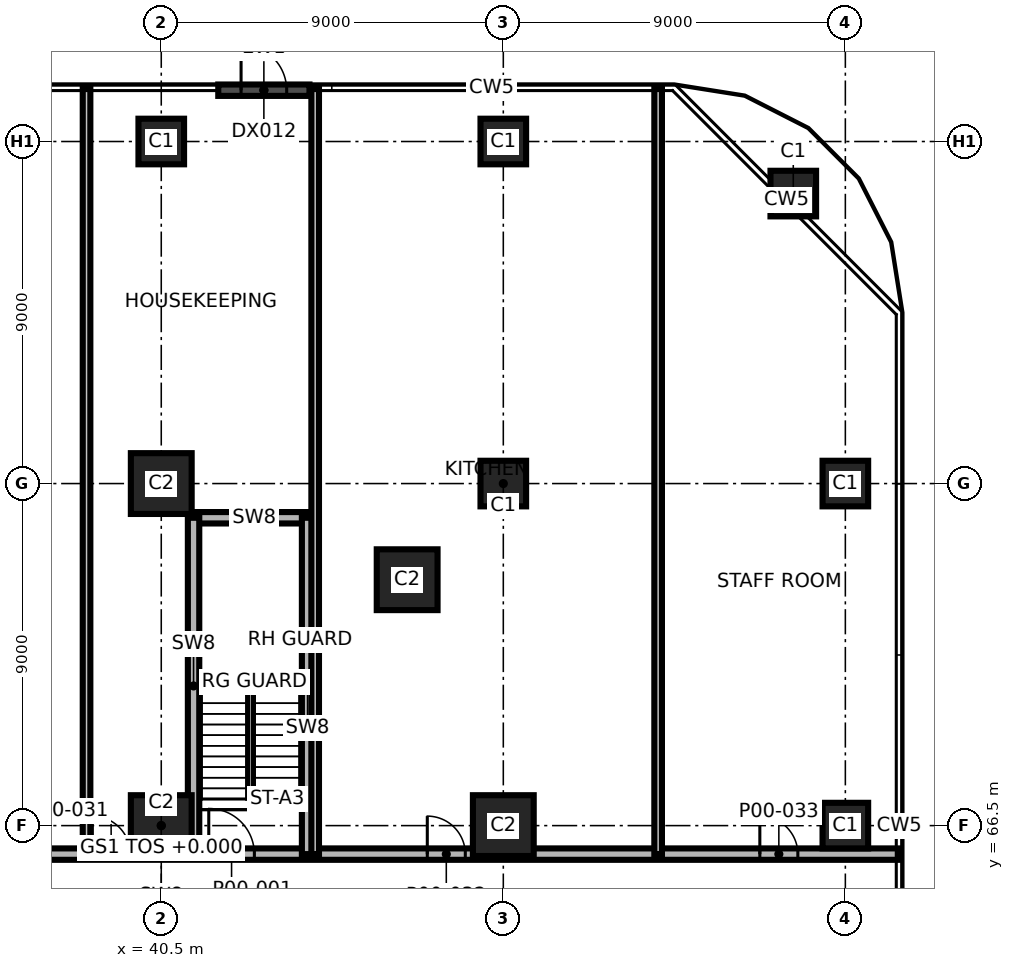
"""IFC4 building model, lengths in metres.
Left out: names, types, materials, properties, quantities, classifications, styles, units other than length and angle.
Written with IfcOpenShell. Run it as: python <this file> out.ifc"""

import sys

from ifc_helpers import new_model, si_unit, direction, frame, frame_2d, origin, origin_2d, place, context, subcontext, project, spatial, rectangle, extrude, element, fill, save


model = new_model("IFC4")
c1 = context("Model", 3, precision=1e-05, world=origin(), true_north=direction((0.0, 1.0)))
c2 = subcontext(c1, "Body", "Model", "MODEL_VIEW")
j1 = project(units=[si_unit("LENGTHUNIT", "METRE"), si_unit("PLANEANGLEUNIT", "RADIAN")], contexts=[c1])
p1 = place(None, origin())
s1 = spatial("IfcSite", under=j1, at=p1, CompositionType="ELEMENT")
p2 = place(p1, origin())
s2 = spatial("IfcBuilding", under=s1, at=p2, CompositionType="ELEMENT")
p3 = place(p2, origin())
s3 = spatial("IfcBuildingStorey", under=s2, at=p3, CompositionType="ELEMENT", Elevation=0.0)
for number, where, z_axis, x_axis in (
    (1, (40.5, 66.5, 0.0), (0.0, 0.0, 1.0), (1.0, 0.0, 0.0)),
    (2, (49.5, 66.5, 0.0), (0.0, 0.0, 1.0), (1.0, 0.0, 0.0)),
):
    element("IfcColumn", number, at=place(p3, frame(where, z_axis=z_axis, x_axis=x_axis)), inside=s3, PredefinedType="COLUMN", context=c2, shape_type="SweptSolid", body=[
        extrude(rectangle(XDim=1.6, YDim=1.6, at=origin_2d()), origin(), (0.0, 0.0, 1.0), 8.0),
    ])
p4 = place(p3, frame((58.5, 66.5, 0.0), z_axis=(0.0, 0.0, 1.0), x_axis=(1.0, 0.0, 0.0)))
e3 = element("IfcColumn", 3, at=p4, inside=s3, PredefinedType="COLUMN", context=c2, shape_type="SweptSolid", body=[
    extrude(rectangle(XDim=1.2, YDim=1.2, at=origin_2d()), origin(), (0.0, 0.0, 1.0), 8.0),
])
p5 = place(p3, frame((40.5, 75.5, 0.0), z_axis=(0.0, 0.0, 1.0), x_axis=(1.0, 0.0, 0.0)))
e4 = element("IfcColumn", 4, at=p5, inside=s3, PredefinedType="COLUMN", context=c2, shape_type="SweptSolid", body=[
    extrude(rectangle(XDim=1.6, YDim=1.6, at=origin_2d()), origin(), (0.0, 0.0, 1.0), 8.0),
])
for number, where, z_axis, x_axis in (
    (5, (49.5, 75.5, 0.0), (0.0, 0.0, 1.0), (1.0, 0.0, 0.0)),
    (6, (58.5, 75.5, 0.0), (0.0, 0.0, 1.0), (1.0, 0.0, 0.0)),
    (7, (57.13, 83.13, 0.0), (0.0, 0.0, 1.0), (1.0, 0.0, 0.0)),
    (8, (40.5, 84.5, 0.0), (0.0, 0.0, 1.0), (1.0, 0.0, 0.0)),
    (9, (49.5, 84.5, 0.0), (0.0, 0.0, 1.0), (1.0, 0.0, 0.0)),
):
    element("IfcColumn", number, at=place(p3, frame(where, z_axis=z_axis, x_axis=x_axis)), inside=s3, PredefinedType="COLUMN", context=c2, shape_type="SweptSolid", body=[
        extrude(rectangle(XDim=1.2, YDim=1.2, at=origin_2d()), origin(), (0.0, 0.0, 1.0), 8.0),
    ])
p6 = place(p3, frame((46.97, 72.97, 0.0), z_axis=(0.0, 0.0, 1.0), x_axis=(1.0, 0.0, 0.0)))
e10 = element("IfcColumn", 10, at=p6, inside=s3, PredefinedType="COLUMN", context=c2, shape_type="SweptSolid", body=[
    extrude(rectangle(XDim=1.6, YDim=1.6, at=origin_2d()), origin(), (0.0, 0.0, 1.0), 8.0),
])
p7 = place(p3, frame((42.0, 85.85, 0.0), z_axis=(0.0, 0.0, 1.0), x_axis=(1.0, 0.0, 0.0)))
e11 = element("IfcWall", 11, at=p7, inside=s3, PredefinedType="SOLIDWALL", context=c2, shape_type="SweptSolid", body=[
    extrude(rectangle(XDim=2.4, YDim=0.3, at=frame_2d((1.2, 0.0))), origin(), (0.0, 0.0, 1.0), 7.7),
])
p8 = place(p7, frame((0.6, 0.0, 0.0)))
e12 = element("IfcOpeningElement", 12, at=p8, cuts=e11, PredefinedType="OPENING", context=c2, shape_type="SweptSolid", body=[
    extrude(rectangle(XDim=1.2, YDim=2.4, at=frame_2d((0.6, 1.2))), frame((0.0, 0.16, 0.0), z_axis=(0.0, -1.0, 0.0), x_axis=(1.0, 0.0, 0.0)), (0.0, 0.0, 1.0), 0.32),
])
p9 = place(p3, frame((21.07, 65.75, 0.0), z_axis=(0.0, 0.0, 1.0), x_axis=(1.0, 0.0, 0.0)))
e13 = element("IfcWall", 13, at=p9, inside=s3, PredefinedType="SHEAR", context=c2, shape_type="SweptSolid", body=[
    extrude(rectangle(XDim=38.86, YDim=0.3, at=frame_2d((19.43, 0.0))), origin(), (0.0, 0.0, 1.0), 7.7),
])
p10 = place(p9, frame((20.68, 0.0, 0.0)))
e14 = element("IfcOpeningElement", 14, at=p10, cuts=e13, PredefinedType="OPENING", context=c2, shape_type="SweptSolid", body=[
    extrude(rectangle(XDim=1.2, YDim=2.1, at=frame_2d((0.6, 1.05))), frame((0.0, 0.16, 0.0), z_axis=(0.0, -1.0, 0.0), x_axis=(1.0, 0.0, 0.0)), (0.0, 0.0, 1.0), 0.32),
])
p11 = place(p9, frame((3.186, 0.0, 0.0)))
e15 = element("IfcOpeningElement", 15, at=p11, cuts=e13, PredefinedType="OPENING", context=c2, shape_type="SweptSolid", body=[
    extrude(rectangle(XDim=1.0, YDim=2.1, at=frame_2d((0.5, 1.05))), frame((0.0, 0.16, 0.0), z_axis=(0.0, -1.0, 0.0), x_axis=(1.0, 0.0, 0.0)), (0.0, 0.0, 1.0), 0.32),
])
p12 = place(p9, frame((11.952, 0.0, 0.0)))
e16 = element("IfcOpeningElement", 16, at=p12, cuts=e13, PredefinedType="OPENING", context=c2, shape_type="SweptSolid", body=[
    extrude(rectangle(XDim=1.0, YDim=2.1, at=frame_2d((0.5, 1.05))), frame((0.0, 0.16, 0.0), z_axis=(0.0, -1.0, 0.0), x_axis=(1.0, 0.0, 0.0)), (0.0, 0.0, 1.0), 0.32),
])
p13 = place(p9, frame((17.615, 0.0, 0.0)))
e17 = element("IfcOpeningElement", 17, at=p13, cuts=e13, PredefinedType="OPENING", context=c2, shape_type="SweptSolid", body=[
    extrude(rectangle(XDim=1.0, YDim=2.1, at=frame_2d((0.5, 1.05))), frame((0.0, 0.16, 0.0), z_axis=(0.0, -1.0, 0.0), x_axis=(1.0, 0.0, 0.0)), (0.0, 0.0, 1.0), 0.32),
])
p14 = place(p9, frame((26.43, 0.0, 0.0)))
e18 = element("IfcOpeningElement", 18, at=p14, cuts=e13, PredefinedType="OPENING", context=c2, shape_type="SweptSolid", body=[
    extrude(rectangle(XDim=1.0, YDim=2.1, at=frame_2d((0.5, 1.05))), frame((0.0, 0.16, 0.0), z_axis=(0.0, -1.0, 0.0), x_axis=(1.0, 0.0, 0.0)), (0.0, 0.0, 1.0), 0.32),
])
p15 = place(p9, frame((35.18, 0.0, 0.0)))
e19 = element("IfcOpeningElement", 19, at=p15, cuts=e13, PredefinedType="OPENING", context=c2, shape_type="SweptSolid", body=[
    extrude(rectangle(XDim=1.0, YDim=2.1, at=frame_2d((0.5, 1.05))), frame((0.0, 0.16, 0.0), z_axis=(0.0, -1.0, 0.0), x_axis=(1.0, 0.0, 0.0)), (0.0, 0.0, 1.0), 0.32),
])
p16 = place(p3, frame((41.35, 74.6, 0.0), z_axis=(0.0, 0.0, 1.0), x_axis=(1.0, 0.0, 0.0)))
e20 = element("IfcWall", 20, at=p16, inside=s3, PredefinedType="SHEAR", context=c2, shape_type="SweptSolid", body=[
    extrude(rectangle(XDim=3.2, YDim=0.3, at=frame_2d((1.6, 0.0))), origin(), (0.0, 0.0, 1.0), 7.7),
])
p17 = place(p3, frame((38.534, 65.75, 0.0), z_axis=(0.0, 0.0, 1.0), x_axis=(0.0, 1.0, 0.0)))
e21 = element("IfcWall", 21, at=p17, inside=s3, PredefinedType="PARTITIONING", context=c2, shape_type="SweptSolid", body=[
    extrude(rectangle(XDim=20.18, YDim=0.2, at=frame_2d((10.09, 0.0))), origin(), (0.0, 0.0, 1.0), 6.8),
])
for number, where, z_axis, x_axis in (
    (22, (41.35, 65.75, 0.0), (0.0, 0.0, 1.0), (0.0, 1.0, 0.0)),
    (23, (44.35, 65.75, 0.0), (0.0, 0.0, 1.0), (0.0, 1.0, 0.0)),
):
    element("IfcWall", number, at=place(p3, frame(where, z_axis=z_axis, x_axis=x_axis)), inside=s3, PredefinedType="SHEAR", context=c2, shape_type="SweptSolid", body=[
        extrude(rectangle(XDim=8.85, YDim=0.3, at=frame_2d((4.425, 0.0))), origin(), (0.0, 0.0, 1.0), 7.7),
    ])
for number, where, z_axis, x_axis in (
    (24, (44.55, 65.75, 0.0), (0.0, 0.0, 1.0), (0.0, 1.0, 0.0)),
    (25, (53.574, 65.75, 0.0), (0.0, 0.0, 1.0), (0.0, 1.0, 0.0)),
):
    element("IfcWall", number, at=place(p3, frame(where, z_axis=z_axis, x_axis=x_axis)), inside=s3, PredefinedType="PARTITIONING", context=c2, shape_type="SweptSolid", body=[
        extrude(rectangle(XDim=20.18, YDim=0.2, at=frame_2d((10.09, 0.0))), origin(), (0.0, 0.0, 1.0), 6.8),
    ])
p18 = place(p8, origin())
e26 = element("IfcDoor", 26, at=p18, inside=s3, OperationType="SINGLE_SWING_LEFT", PredefinedType="DOOR", context=c2, shape_type="SweptSolid", body=[
    extrude(rectangle(XDim=1.2, YDim=2.4, at=frame_2d((0.6, 1.2))), frame((0.0, 0.025, 0.0), z_axis=(0.0, -1.0, 0.0), x_axis=(1.0, 0.0, 0.0)), (0.0, 0.0, 1.0), 0.05),
])
fill(e12, e26)
p19 = place(p10, origin())
e27 = element("IfcDoor", 27, at=p19, inside=s3, OperationType="SINGLE_SWING_LEFT", PredefinedType="DOOR", context=c2, shape_type="SweptSolid", body=[
    extrude(rectangle(XDim=1.2, YDim=2.1, at=frame_2d((0.6, 1.05))), frame((0.0, 0.025, 0.0), z_axis=(0.0, -1.0, 0.0), x_axis=(1.0, 0.0, 0.0)), (0.0, 0.0, 1.0), 0.05),
])
fill(e14, e27)
p20 = place(p13, origin())
e28 = element("IfcDoor", 28, at=p20, inside=s3, OperationType="SINGLE_SWING_LEFT", PredefinedType="DOOR", context=c2, shape_type="SweptSolid", body=[
    extrude(rectangle(XDim=1.0, YDim=2.1, at=frame_2d((0.5, 1.05))), frame((0.0, 0.025, 0.0), z_axis=(0.0, -1.0, 0.0), x_axis=(1.0, 0.0, 0.0)), (0.0, 0.0, 1.0), 0.05),
])
fill(e17, e28)
p21 = place(p14, origin())
e29 = element("IfcDoor", 29, at=p21, inside=s3, OperationType="SINGLE_SWING_RIGHT", PredefinedType="DOOR", context=c2, shape_type="SweptSolid", body=[
    extrude(rectangle(XDim=1.0, YDim=2.1, at=frame_2d((0.5, 1.05))), frame((0.0, 0.025, 0.0), z_axis=(0.0, -1.0, 0.0), x_axis=(1.0, 0.0, 0.0)), (0.0, 0.0, 1.0), 0.05),
])
fill(e18, e29)
p22 = place(p15, origin())
e30 = element("IfcDoor", 30, at=p22, inside=s3, OperationType="SINGLE_SWING_LEFT", PredefinedType="DOOR", context=c2, shape_type="SweptSolid", body=[
    extrude(rectangle(XDim=1.0, YDim=2.1, at=frame_2d((0.5, 1.05))), frame((0.0, 0.025, 0.0), z_axis=(0.0, -1.0, 0.0), x_axis=(1.0, 0.0, 0.0)), (0.0, 0.0, 1.0), 0.05),
])
fill(e19, e30)
save(model, sys.argv[1])
